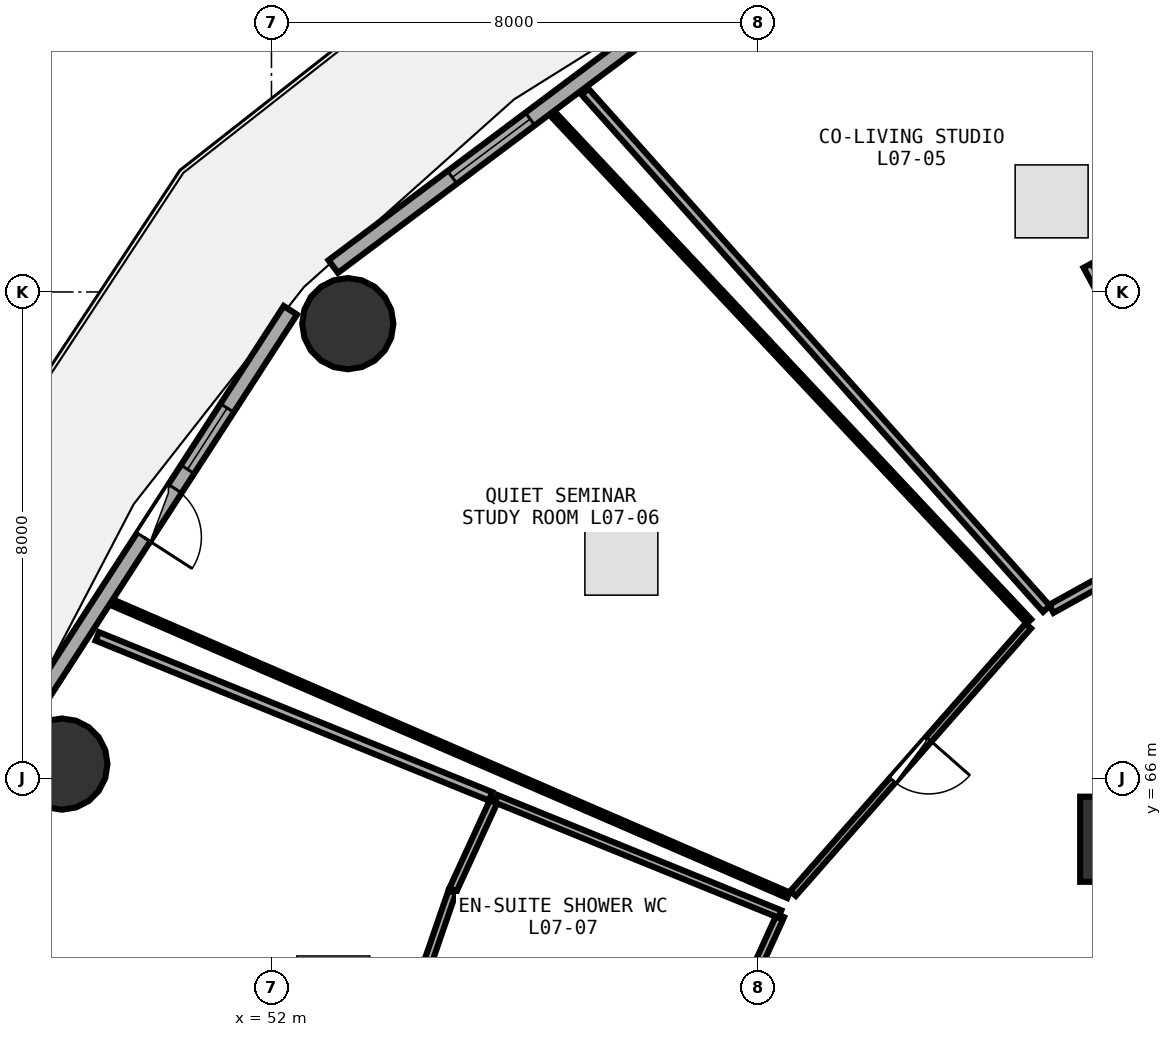
"""IFC4 building model, lengths in metres.
Left out: names, types, materials, properties, quantities, classifications, styles, units other than length and angle.
Written with IfcOpenShell. Run it as: python <this file> out.ifc"""

import sys

from ifc_helpers import new_model, si_unit, direction, frame, frame_2d, origin, origin_2d, place, context, subcontext, project, spatial, rectangle, circle, extrude, element, fill, save


model = new_model("IFC4")
c1 = context("Model", 3, precision=1e-05, world=origin(), true_north=direction((0.0, 1.0)))
c2 = subcontext(c1, "Body", "Model", "MODEL_VIEW")
j1 = project(units=[si_unit("LENGTHUNIT", "METRE"), si_unit("PLANEANGLEUNIT", "RADIAN")], contexts=[c1])
p1 = place(None, origin())
s1 = spatial("IfcSite", under=j1, at=p1, CompositionType="ELEMENT")
p2 = place(p1, origin())
s2 = spatial("IfcBuilding", under=s1, at=p2, CompositionType="ELEMENT")
p3 = place(p2, frame((0.0, 0.0, 30.0)))
s3 = spatial("IfcBuildingStorey", under=s2, at=p3, CompositionType="ELEMENT", Elevation=30.0)
p4 = place(p3, frame((66.0, 65.0, 0.0), z_axis=(0.0, 0.0, 1.0), x_axis=(1.0, 0.0, 0.0)))
e1 = element("IfcColumn", 1, at=p4, inside=s3, PredefinedType="PILASTER", context=c2, shape_type="SweptSolid", body=[
    extrude(rectangle(XDim=1.4, YDim=1.4, at=origin_2d()), origin(), (0.0, 0.0, 1.0), 3.75),
])
for number, where, z_axis, x_axis in (
    (2, (53.256, 73.478, 0.0), (0.0, 0.0, 1.0), (1.0, 0.0, 0.0)),
    (3, (48.553, 66.236, 0.0), (0.0, 0.0, 1.0), (1.0, 0.0, 0.0)),
):
    element("IfcColumn", number, at=place(p3, frame(where, z_axis=z_axis, x_axis=x_axis)), inside=s3, PredefinedType="COLUMN", context=c2, shape_type="SweptSolid", body=[
        extrude(circle(Radius=0.75, at=origin_2d()), origin(), (0.0, 0.0, 1.0), 3.75),
    ])
p5 = place(p3, frame((59.651, 79.389, 0.0), z_axis=(0.0, 0.0, 1.0), x_axis=(-0.80030733173, -0.599590005569, 0.0)))
e4 = element("IfcWall", 4, at=p5, inside=s3, PredefinedType="SOLIDWALL", context=c2, shape_type="SweptSolid", body=[
    extrude(rectangle(XDim=8.291, YDim=0.26, at=frame_2d((4.145, 0.0))), origin(), (0.0, 0.0, 1.0), 3.475),
])
p6 = place(p5, frame((4.245, 0.0, 0.85)))
e5 = element("IfcOpeningElement", 5, at=p6, cuts=e4, PredefinedType="OPENING", context=c2, shape_type="SweptSolid", body=[
    extrude(rectangle(XDim=1.6, YDim=1.45, at=frame_2d((0.8, 0.725))), frame((0.0, 0.14, 0.0), z_axis=(0.0, -1.0, 0.0), x_axis=(1.0, 0.0, 0.0)), (0.0, 0.0, 1.0), 0.28),
])
p7 = place(p3, frame((52.311, 73.698, 0.0), z_axis=(0.0, 0.0, 1.0), x_axis=(-0.543005114258, -0.839729388488, 0.0)))
e6 = element("IfcWall", 6, at=p7, inside=s3, PredefinedType="SOLIDWALL", context=c2, shape_type="SweptSolid", body=[
    extrude(rectangle(XDim=7.938, YDim=0.26, at=frame_2d((3.969, 0.0))), origin(), (0.0, 0.0, 1.0), 3.475),
])
p8 = place(p7, frame((3.494, 0.0, 0.0)))
e7 = element("IfcOpeningElement", 7, at=p8, cuts=e6, PredefinedType="OPENING", context=c2, shape_type="SweptSolid", body=[
    extrude(rectangle(XDim=0.95, YDim=2.1, at=frame_2d((0.475, 1.05))), frame((0.0, 0.14, 0.0), z_axis=(0.0, -1.0, 0.0), x_axis=(1.0, 0.0, 0.0)), (0.0, 0.0, 1.0), 0.28),
])
p9 = place(p7, frame((1.914, 0.0, 0.85)))
e8 = element("IfcOpeningElement", 8, at=p9, cuts=e6, PredefinedType="OPENING", context=c2, shape_type="SweptSolid", body=[
    extrude(rectangle(XDim=1.2, YDim=1.45, at=frame_2d((0.6, 0.725))), frame((0.0, 0.14, 0.0), z_axis=(0.0, -1.0, 0.0), x_axis=(1.0, 0.0, 0.0)), (0.0, 0.0, 1.0), 0.28),
])
p10 = place(p3, frame((67.571, 70.313, 0.0), z_axis=(0.0, 0.0, 1.0), x_axis=(-0.874179278891, -0.48560332408, 0.0)))
e9 = element("IfcWall", 9, at=p10, inside=s3, PredefinedType="PARTITIONING", context=c2, shape_type="SweptSolid", body=[
    extrude(rectangle(XDim=3.14, YDim=0.15, at=frame_2d((1.57, 0.0))), origin(), (0.0, 0.0, 1.0), 3.48),
])
p11 = place(p10, frame((1.095, 0.0, 0.0)))
e10 = element("IfcOpeningElement", 10, at=p11, cuts=e9, PredefinedType="OPENING", context=c2, shape_type="SweptSolid", body=[
    extrude(rectangle(XDim=0.95, YDim=2.08, at=frame_2d((0.475, 1.04))), frame((0.0, 0.085, 0.0), z_axis=(0.0, -1.0, 0.0), x_axis=(1.0, 0.0, 0.0)), (0.0, 0.0, 1.0), 0.17),
])
p12 = place(p3, frame((64.446, 68.507, 0.0), z_axis=(0.0, 0.0, 1.0), x_axis=(-0.660323401664, -0.75098136143, 0.0)))
e11 = element("IfcWall", 11, at=p12, inside=s3, PredefinedType="PARTITIONING", context=c2, shape_type="SweptSolid", body=[
    extrude(rectangle(XDim=5.857, YDim=0.12, at=frame_2d((2.929, 0.0))), origin(), (0.0, 0.0, 1.0), 2.875),
])
p13 = place(p12, frame((2.479, 0.0, 0.0)))
e12 = element("IfcOpeningElement", 12, at=p13, cuts=e11, PredefinedType="OPENING", context=c2, shape_type="SweptSolid", body=[
    extrude(rectangle(XDim=0.9, YDim=2.08, at=frame_2d((0.45, 1.04))), frame((0.0, 0.07, 0.0), z_axis=(0.0, -1.0, 0.0), x_axis=(1.0, 0.0, 0.0)), (0.0, 0.0, 1.0), 0.14),
])
p14 = place(p3, frame((64.746, 68.789, 0.0), z_axis=(0.0, 0.0, 1.0), x_axis=(-0.66580890104, 0.746122313897, 0.0)))
e13 = element("IfcWall", 13, at=p14, inside=s3, PredefinedType="PARTITIONING", context=c2, shape_type="SweptSolid", body=[
    extrude(rectangle(XDim=11.399, YDim=0.15, at=frame_2d((5.7, 0.0))), origin(), (0.0, 0.0, 1.0), 2.875),
])
p15 = place(p3, frame((65.423, 74.434, 0.0), z_axis=(0.0, 0.0, 1.0), x_axis=(0.473660949034, -0.880707275637, 0.0)))
e14 = element("IfcWall", 14, at=p15, inside=s3, PredefinedType="PARTITIONING", context=c2, shape_type="SweptSolid", body=[
    extrude(rectangle(XDim=1.891, YDim=0.15, at=frame_2d((0.946, 0.0))), origin(), (0.0, 0.0, 1.0), 3.175),
])
p16 = place(p3, frame((60.502, 64.079, 0.0), z_axis=(0.0, 0.0, 1.0), x_axis=(-0.917695041134, 0.397285554077, 0.0)))
e15 = element("IfcWall", 15, at=p16, inside=s3, PredefinedType="PARTITIONING", context=c2, shape_type="SweptSolid", body=[
    extrude(rectangle(XDim=12.07, YDim=0.1, at=frame_2d((6.035, 0.0))), origin(), (0.0, 0.0, 1.0), 2.875),
])
p17 = place(p3, frame((56.632, 76.922, 0.0), z_axis=(0.0, 0.0, 1.0), x_axis=(0.684261294523, -0.729236916796, 0.0)))
e16 = element("IfcWall", 16, at=p17, inside=s3, PredefinedType="PARTITIONING", context=c2, shape_type="SweptSolid", body=[
    extrude(rectangle(XDim=11.438, YDim=0.1, at=frame_2d((5.719, 0.0))), origin(), (0.0, 0.0, 1.0), 2.875),
])
p18 = place(p3, frame((60.372, 63.745, 0.0), z_axis=(0.0, 0.0, 1.0), x_axis=(-0.4138937247, -0.910325208183, 0.0)))
e17 = element("IfcWall", 17, at=p18, inside=s3, PredefinedType="PLUMBINGWALL", context=c2, shape_type="SweptSolid", body=[
    extrude(rectangle(XDim=1.216, YDim=0.13, at=frame_2d((0.608, 0.0))), origin(), (0.0, 0.0, 1.0), 3.48),
])
p19 = place(p3, frame((54.441, 62.598, 0.0), z_axis=(0.0, 0.0, 1.0), x_axis=(0.326356647952, 0.945246707657, 0.0)))
e18 = element("IfcWall", 18, at=p19, inside=s3, PredefinedType="PLUMBINGWALL", context=c2, shape_type="SweptSolid", body=[
    extrude(rectangle(XDim=1.624, YDim=0.13, at=frame_2d((0.812, 0.0))), origin(), (0.0, 0.0, 1.0), 3.48),
])
p20 = place(p3, frame((54.986, 64.17, 0.0), z_axis=(0.0, 0.0, 1.0), x_axis=(0.41762687648, 0.908618617486, 0.0)))
e19 = element("IfcWall", 19, at=p20, inside=s3, PredefinedType="PLUMBINGWALL", context=c2, shape_type="SweptSolid", body=[
    extrude(rectangle(XDim=1.634, YDim=0.13, at=frame_2d((0.817, 0.0))), origin(), (0.0, 0.0, 1.0), 2.875),
])
p21 = place(p3, frame((55.696, 65.666, 0.0), z_axis=(0.0, 0.0, 1.0), x_axis=(0.926504606816, -0.376283421835, 0.0)))
e20 = element("IfcWall", 20, at=p21, inside=s3, PredefinedType="PLUMBINGWALL", context=c2, shape_type="SweptSolid", body=[
    extrude(rectangle(XDim=5.036, YDim=0.13, at=frame_2d((2.518, 0.0))), origin(), (0.0, 0.0, 1.0), 2.875),
])
p22 = place(p3, frame((49.135, 68.336, 0.0), z_axis=(0.0, 0.0, 1.0), x_axis=(0.926325178802, -0.376724917038, 0.0)))
e21 = element("IfcWall", 21, at=p22, inside=s3, PredefinedType="PARTITIONING", context=c2, shape_type="SweptSolid", body=[
    extrude(rectangle(XDim=6.983, YDim=0.15, at=frame_2d((3.492, 0.0))), origin(), (0.0, 0.0, 1.0), 2.875),
])
p23 = place(p6, origin())
e22 = element("IfcWindow", 22, at=p23, inside=s3, PartitioningType="SINGLE_PANEL", PredefinedType="WINDOW", context=c2, shape_type="SweptSolid", body=[
    extrude(rectangle(XDim=1.6, YDim=1.45, at=frame_2d((0.8, 0.725))), frame((0.0, 0.03, 0.0), z_axis=(0.0, -1.0, 0.0), x_axis=(1.0, 0.0, 0.0)), (0.0, 0.0, 1.0), 0.06),
])
fill(e5, e22)
p24 = place(p8, frame((0.95, 0.0, 0.0), z_axis=(0.0, 0.0, 1.0), x_axis=(-1.0, 0.0, 0.0)))
e23 = element("IfcDoor", 23, at=p24, inside=s3, OperationType="SINGLE_SWING_LEFT", PredefinedType="DOOR", context=c2, shape_type="SweptSolid", body=[
    extrude(rectangle(XDim=0.95, YDim=2.1, at=frame_2d((0.475, 1.05))), frame((0.0, 0.025, 0.0), z_axis=(0.0, -1.0, 0.0), x_axis=(1.0, 0.0, 0.0)), (0.0, 0.0, 1.0), 0.05),
])
fill(e7, e23)
p25 = place(p9, origin())
e24 = element("IfcWindow", 24, at=p25, inside=s3, PartitioningType="SINGLE_PANEL", PredefinedType="WINDOW", context=c2, shape_type="SweptSolid", body=[
    extrude(rectangle(XDim=1.2, YDim=1.45, at=frame_2d((0.6, 0.725))), frame((0.0, 0.03, 0.0), z_axis=(0.0, -1.0, 0.0), x_axis=(1.0, 0.0, 0.0)), (0.0, 0.0, 1.0), 0.06),
])
fill(e8, e24)
p26 = place(p13, origin())
e25 = element("IfcDoor", 25, at=p26, inside=s3, OperationType="SINGLE_SWING_LEFT", PredefinedType="DOOR", context=c2, shape_type="SweptSolid", body=[
    extrude(rectangle(XDim=0.9, YDim=2.08, at=frame_2d((0.45, 1.04))), frame((0.0, 0.025, 0.0), z_axis=(0.0, -1.0, 0.0), x_axis=(1.0, 0.0, 0.0)), (0.0, 0.0, 1.0), 0.05),
])
fill(e12, e25)
save(model, sys.argv[1])
